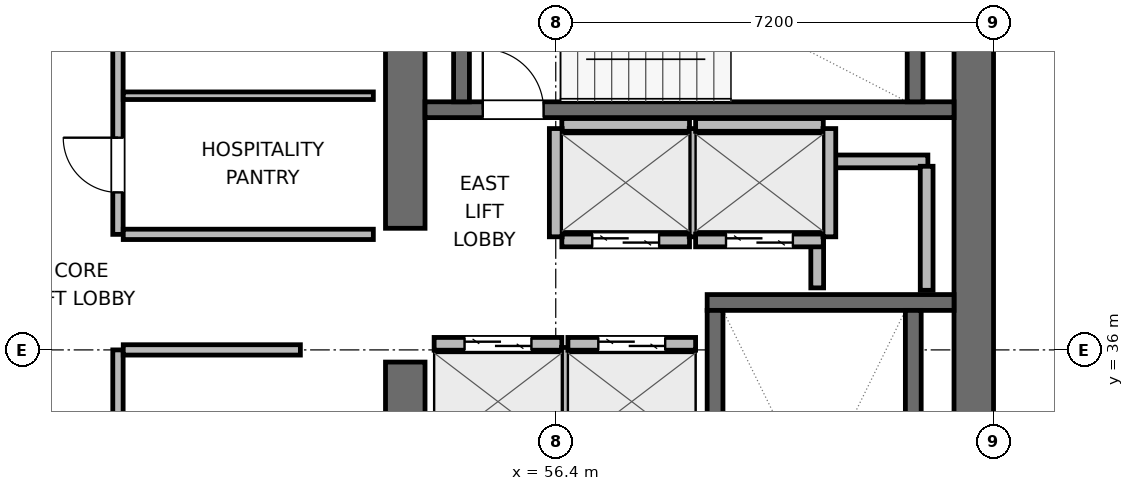
"""IFC4 building model, lengths in metres.
Left out: names, types, materials, properties, quantities, classifications, styles, units other than length and angle.
Written with IfcOpenShell. Run it as: python <this file> out.ifc"""

import sys

from ifc_helpers import new_model, si_unit, direction, frame, frame_2d, origin, place, context, subcontext, project, spatial, rectangle, extrude, element, fill, save


model = new_model("IFC4")
c1 = context("Model", 3, precision=1e-05, world=origin(), true_north=direction((0.0, 1.0)))
c2 = subcontext(c1, "Body", "Model", "MODEL_VIEW")
j1 = project(units=[si_unit("LENGTHUNIT", "METRE"), si_unit("PLANEANGLEUNIT", "RADIAN")], contexts=[c1])
p1 = place(None, origin())
s1 = spatial("IfcSite", under=j1, at=p1, CompositionType="ELEMENT")
p2 = place(p1, origin())
s2 = spatial("IfcBuilding", under=s1, at=p2, CompositionType="ELEMENT")
p3 = place(p2, frame((0.0, 0.0, 219.3)))
s3 = spatial("IfcBuildingStorey", under=s2, at=p3, CompositionType="ELEMENT", Elevation=219.3)
p4 = place(p3, frame((53.925, 27.925, 0.0), z_axis=(0.0, 0.0, 1.0), x_axis=(0.0, 1.0, 0.0)))
e1 = element("IfcWall", 1, at=p4, inside=s3, PredefinedType="SHEAR", context=c2, shape_type="SweptSolid", body=[
    extrude(rectangle(XDim=7.875, YDim=0.65, at=frame_2d((3.938, 0.0))), origin(), (0.0, 0.0, 1.0), 3.9),
])
p5 = place(p3, frame((53.925, 38.0, 0.0), z_axis=(0.0, 0.0, 1.0), x_axis=(0.0, 1.0, 0.0)))
e2 = element("IfcWall", 2, at=p5, inside=s3, PredefinedType="SHEAR", context=c2, shape_type="SweptSolid", body=[
    extrude(rectangle(XDim=6.075, YDim=0.65, at=frame_2d((3.038, 0.0))), origin(), (0.0, 0.0, 1.0), 3.9),
])
p6 = place(p3, frame((63.275, 27.6, 0.0), z_axis=(0.0, 0.0, 1.0), x_axis=(0.0, 1.0, 0.0)))
e3 = element("IfcWall", 3, at=p6, inside=s3, PredefinedType="SHEAR", context=c2, shape_type="SweptSolid", body=[
    extrude(rectangle(XDim=16.8, YDim=0.65, at=frame_2d((8.4, 0.0))), origin(), (0.0, 0.0, 1.0), 3.9),
])
p7 = place(p3, frame((58.89, 36.78, 0.0), z_axis=(0.0, 0.0, 1.0), x_axis=(1.0, 0.0, 0.0)))
e4 = element("IfcWall", 4, at=p7, inside=s3, PredefinedType="SHEAR", context=c2, shape_type="SweptSolid", body=[
    extrude(rectangle(XDim=4.06, YDim=0.26, at=frame_2d((2.03, 0.0))), origin(), (0.0, 0.0, 1.0), 3.9),
])
p8 = place(p3, frame((59.02, 29.05, 0.0), z_axis=(0.0, 0.0, 1.0), x_axis=(0.0, 1.0, 0.0)))
e5 = element("IfcWall", 5, at=p8, inside=s3, PredefinedType="SHEAR", context=c2, shape_type="SweptSolid", body=[
    extrude(rectangle(XDim=7.6, YDim=0.26, at=frame_2d((3.8, 0.0))), origin(), (0.0, 0.0, 1.0), 3.9),
])
p9 = place(p8, frame((0.3, 0.0, 0.0)))
e6 = element("IfcOpeningElement", 6, at=p9, cuts=e5, PredefinedType="OPENING", context=c2, shape_type="SweptSolid", body=[
    extrude(rectangle(XDim=1.0, YDim=2.04, at=frame_2d((0.5, 1.02))), frame((0.0, 0.14, 0.0), z_axis=(0.0, -1.0, 0.0), x_axis=(1.0, 0.0, 0.0)), (0.0, 0.0, 1.0), 0.28),
])
p10 = place(p3, frame((62.28, 29.05, 0.0), z_axis=(0.0, 0.0, 1.0), x_axis=(0.0, 1.0, 0.0)))
e7 = element("IfcWall", 7, at=p10, inside=s3, PredefinedType="SHEAR", context=c2, shape_type="SweptSolid", body=[
    extrude(rectangle(XDim=7.6, YDim=0.26, at=frame_2d((3.8, 0.0))), origin(), (0.0, 0.0, 1.0), 3.9),
])
p11 = place(p3, frame((54.25, 39.95, 0.0), z_axis=(0.0, 0.0, 1.0), x_axis=(1.0, 0.0, 0.0)))
e8 = element("IfcWall", 8, at=p11, inside=s3, PredefinedType="SHEAR", context=c2, shape_type="SweptSolid", body=[
    extrude(rectangle(XDim=8.7, YDim=0.26, at=frame_2d((4.35, 0.0))), origin(), (0.0, 0.0, 1.0), 3.9),
])
p12 = place(p11, frame((0.95, 0.0, 0.0)))
e9 = element("IfcOpeningElement", 9, at=p12, cuts=e8, PredefinedType="OPENING", context=c2, shape_type="SweptSolid", body=[
    extrude(rectangle(XDim=1.0, YDim=2.04, at=frame_2d((0.5, 1.02))), frame((0.0, 0.14, 0.0), z_axis=(0.0, -1.0, 0.0), x_axis=(1.0, 0.0, 0.0)), (0.0, 0.0, 1.0), 0.28),
])
for number, where, z_axis, x_axis in (
    (10, (54.85, 40.08, 0.0), (0.0, 0.0, 1.0), (0.0, 1.0, 0.0)),
    (11, (62.31, 40.08, 0.0), (0.0, 0.0, 1.0), (0.0, 1.0, 0.0)),
):
    element("IfcWall", number, at=place(p3, frame(where, z_axis=z_axis, x_axis=x_axis)), inside=s3, PredefinedType="SHEAR", context=c2, shape_type="SweptSolid", body=[
        extrude(rectangle(XDim=2.94, YDim=0.26, at=frame_2d((1.47, 0.0))), origin(), (0.0, 0.0, 1.0), 3.9),
    ])
p13 = place(p3, frame((60.72, 39.1, 0.0), z_axis=(0.0, 0.0, 1.0), x_axis=(1.0, 0.0, 0.0)))
e12 = element("IfcWall", 12, at=p13, inside=s3, PredefinedType="PARTITIONING", context=c2, shape_type="SweptSolid", body=[
    extrude(rectangle(XDim=1.8, YDim=0.21, at=frame_2d((0.9, 0.0))), origin(), (0.0, 0.0, 1.0), 3.68),
])
p14 = place(p3, frame((60.7, 37.02, 0.0), z_axis=(0.0, 0.0, 1.0), x_axis=(0.0, 1.0, 0.0)))
e13 = element("IfcWall", 13, at=p14, inside=s3, PredefinedType="PARTITIONING", context=c2, shape_type="SweptSolid", body=[
    extrude(rectangle(XDim=1.96, YDim=0.21, at=frame_2d((0.98, 0.0))), origin(), (0.0, 0.0, 1.0), 3.68),
])
p15 = place(p3, frame((62.5, 36.98, 0.0), z_axis=(0.0, 0.0, 1.0), x_axis=(0.0, 1.0, 0.0)))
e14 = element("IfcWall", 14, at=p15, inside=s3, PredefinedType="PARTITIONING", context=c2, shape_type="SweptSolid", body=[
    extrude(rectangle(XDim=2.04, YDim=0.21, at=frame_2d((1.02, 0.0))), origin(), (0.0, 0.0, 1.0), 3.68),
])
p16 = place(p3, frame((54.4, 36.1, 0.0), z_axis=(0.0, 0.0, 1.0), x_axis=(1.0, 0.0, 0.0)))
e15 = element("IfcWall", 15, at=p16, inside=s3, PredefinedType="PARTITIONING", context=c2, shape_type="SweptSolid", body=[
    extrude(rectangle(XDim=2.1, YDim=0.21, at=frame_2d((1.05, 0.0))), origin(), (0.0, 0.0, 1.0), 3.68),
])
p17 = place(p16, frame((0.5, 0.0, 0.0)))
e16 = element("IfcOpeningElement", 16, at=p17, cuts=e15, PredefinedType="OPENING", context=c2, shape_type="SweptSolid", body=[
    extrude(rectangle(XDim=1.1, YDim=2.04, at=frame_2d((0.55, 1.02))), frame((0.0, 0.115, 0.0), z_axis=(0.0, -1.0, 0.0), x_axis=(1.0, 0.0, 0.0)), (0.0, 0.0, 1.0), 0.23),
])
p18 = place(p3, frame((56.6, 34.26, 0.0), z_axis=(0.0, 0.0, 1.0), x_axis=(0.0, 1.0, 0.0)))
e17 = element("IfcWall", 17, at=p18, inside=s3, PredefinedType="PARTITIONING", context=c2, shape_type="SweptSolid", body=[
    extrude(rectangle(XDim=1.78, YDim=0.21, at=frame_2d((0.89, 0.0))), origin(), (0.0, 0.0, 1.0), 3.68),
])
p19 = place(p3, frame((56.6, 36.1, 0.0), z_axis=(0.0, 0.0, 1.0), x_axis=(1.0, 0.0, 0.0)))
e18 = element("IfcWall", 18, at=p19, inside=s3, PredefinedType="PARTITIONING", context=c2, shape_type="SweptSolid", body=[
    extrude(rectangle(XDim=2.1, YDim=0.21, at=frame_2d((1.05, 0.0))), origin(), (0.0, 0.0, 1.0), 3.68),
])
p20 = place(p19, frame((0.5, 0.0, 0.0)))
e19 = element("IfcOpeningElement", 19, at=p20, cuts=e18, PredefinedType="OPENING", context=c2, shape_type="SweptSolid", body=[
    extrude(rectangle(XDim=1.1, YDim=2.04, at=frame_2d((0.55, 1.02))), frame((0.0, 0.115, 0.0), z_axis=(0.0, -1.0, 0.0), x_axis=(1.0, 0.0, 0.0)), (0.0, 0.0, 1.0), 0.23),
])
p21 = place(p3, frame((56.5, 37.8, 0.0), z_axis=(0.0, 0.0, 1.0), x_axis=(1.0, 0.0, 0.0)))
e20 = element("IfcWall", 20, at=p21, inside=s3, PredefinedType="PARTITIONING", context=c2, shape_type="SweptSolid", body=[
    extrude(rectangle(XDim=2.1, YDim=0.21, at=frame_2d((1.05, 0.0))), origin(), (0.0, 0.0, 1.0), 3.68),
])
p22 = place(p21, frame((0.5, 0.0, 0.0)))
e21 = element("IfcOpeningElement", 21, at=p22, cuts=e20, PredefinedType="OPENING", context=c2, shape_type="SweptSolid", body=[
    extrude(rectangle(XDim=1.1, YDim=2.04, at=frame_2d((0.55, 1.02))), frame((0.0, 0.115, 0.0), z_axis=(0.0, -1.0, 0.0), x_axis=(1.0, 0.0, 0.0)), (0.0, 0.0, 1.0), 0.23),
])
p23 = place(p3, frame((56.5, 39.7, 0.0), z_axis=(0.0, 0.0, 1.0), x_axis=(1.0, 0.0, 0.0)))
e22 = element("IfcWall", 22, at=p23, inside=s3, PredefinedType="PARTITIONING", context=c2, shape_type="SweptSolid", body=[
    extrude(rectangle(XDim=2.1, YDim=0.21, at=frame_2d((1.05, 0.0))), origin(), (0.0, 0.0, 1.0), 3.68),
])
for number, where, z_axis, x_axis in (
    (23, (56.4, 37.86, 0.0), (0.0, 0.0, 1.0), (0.0, 1.0, 0.0)),
    (24, (58.7, 37.86, 0.0), (0.0, 0.0, 1.0), (0.0, 1.0, 0.0)),
):
    element("IfcWall", number, at=place(p3, frame(where, z_axis=z_axis, x_axis=x_axis)), inside=s3, PredefinedType="PARTITIONING", context=c2, shape_type="SweptSolid", body=[
        extrude(rectangle(XDim=1.78, YDim=0.21, at=frame_2d((0.89, 0.0))), origin(), (0.0, 0.0, 1.0), 3.68),
    ])
p24 = place(p3, frame((58.7, 37.8, 0.0), z_axis=(0.0, 0.0, 1.0), x_axis=(1.0, 0.0, 0.0)))
e25 = element("IfcWall", 25, at=p24, inside=s3, PredefinedType="PARTITIONING", context=c2, shape_type="SweptSolid", body=[
    extrude(rectangle(XDim=2.1, YDim=0.21, at=frame_2d((1.05, 0.0))), origin(), (0.0, 0.0, 1.0), 3.68),
])
p25 = place(p24, frame((0.5, 0.0, 0.0)))
e26 = element("IfcOpeningElement", 26, at=p25, cuts=e25, PredefinedType="OPENING", context=c2, shape_type="SweptSolid", body=[
    extrude(rectangle(XDim=1.1, YDim=2.04, at=frame_2d((0.55, 1.02))), frame((0.0, 0.115, 0.0), z_axis=(0.0, -1.0, 0.0), x_axis=(1.0, 0.0, 0.0)), (0.0, 0.0, 1.0), 0.23),
])
p26 = place(p3, frame((58.7, 39.7, 0.0), z_axis=(0.0, 0.0, 1.0), x_axis=(1.0, 0.0, 0.0)))
e27 = element("IfcWall", 27, at=p26, inside=s3, PredefinedType="PARTITIONING", context=c2, shape_type="SweptSolid", body=[
    extrude(rectangle(XDim=2.1, YDim=0.21, at=frame_2d((1.05, 0.0))), origin(), (0.0, 0.0, 1.0), 3.68),
])
p27 = place(p3, frame((60.9, 37.86, 0.0), z_axis=(0.0, 0.0, 1.0), x_axis=(0.0, 1.0, 0.0)))
e28 = element("IfcWall", 28, at=p27, inside=s3, PredefinedType="PARTITIONING", context=c2, shape_type="SweptSolid", body=[
    extrude(rectangle(XDim=1.78, YDim=0.21, at=frame_2d((0.89, 0.0))), origin(), (0.0, 0.0, 1.0), 3.68),
])
p28 = place(p3, frame((49.2, 32.6, 0.0), z_axis=(0.0, 0.0, 1.0), x_axis=(0.0, 1.0, 0.0)))
e29 = element("IfcWall", 29, at=p28, inside=s3, PredefinedType="PARTITIONING", context=c2, shape_type="SweptSolid", body=[
    extrude(rectangle(XDim=3.4, YDim=0.17, at=frame_2d((1.7, 0.0))), origin(), (0.0, 0.0, 1.0), 3.68),
])
p29 = place(p28, frame((0.638, 0.0, 0.0)))
e30 = element("IfcOpeningElement", 30, at=p29, cuts=e29, PredefinedType="OPENING", context=c2, shape_type="SweptSolid", body=[
    extrude(rectangle(XDim=0.9, YDim=2.02, at=frame_2d((0.45, 1.01))), frame((0.0, 0.095, 0.0), z_axis=(0.0, -1.0, 0.0), x_axis=(1.0, 0.0, 0.0)), (0.0, 0.0, 1.0), 0.19),
])
p30 = place(p3, frame((49.287, 36.0, 0.0), z_axis=(0.0, 0.0, 1.0), x_axis=(1.0, 0.0, 0.0)))
e31 = element("IfcWall", 31, at=p30, inside=s3, PredefinedType="PARTITIONING", context=c2, shape_type="SweptSolid", body=[
    extrude(rectangle(XDim=2.913, YDim=0.17, at=frame_2d((1.457, 0.0))), origin(), (0.0, 0.0, 1.0), 3.68),
])
p31 = place(p3, frame((49.2, 37.9, 0.0), z_axis=(0.0, 0.0, 1.0), x_axis=(0.0, 1.0, 0.0)))
e32 = element("IfcWall", 32, at=p31, inside=s3, PredefinedType="PARTITIONING", context=c2, shape_type="SweptSolid", body=[
    extrude(rectangle(XDim=6.0, YDim=0.17, at=frame_2d((3.0, 0.0))), origin(), (0.0, 0.0, 1.0), 3.68),
])
p32 = place(p31, frame((0.69, 0.0, 0.0)))
e33 = element("IfcOpeningElement", 33, at=p32, cuts=e32, PredefinedType="OPENING", context=c2, shape_type="SweptSolid", body=[
    extrude(rectangle(XDim=0.9, YDim=2.02, at=frame_2d((0.45, 1.01))), frame((0.0, 0.095, 0.0), z_axis=(0.0, -1.0, 0.0), x_axis=(1.0, 0.0, 0.0)), (0.0, 0.0, 1.0), 0.19),
])
p33 = place(p31, frame((3.69, 0.0, 0.0)))
e34 = element("IfcOpeningElement", 34, at=p33, cuts=e32, PredefinedType="OPENING", context=c2, shape_type="SweptSolid", body=[
    extrude(rectangle(XDim=0.9, YDim=2.02, at=frame_2d((0.45, 1.01))), frame((0.0, 0.095, 0.0), z_axis=(0.0, -1.0, 0.0), x_axis=(1.0, 0.0, 0.0)), (0.0, 0.0, 1.0), 0.19),
])
p34 = place(p3, frame((49.287, 37.9, 0.0), z_axis=(0.0, 0.0, 1.0), x_axis=(1.0, 0.0, 0.0)))
e35 = element("IfcWall", 35, at=p34, inside=s3, PredefinedType="PARTITIONING", context=c2, shape_type="SweptSolid", body=[
    extrude(rectangle(XDim=4.113, YDim=0.17, at=frame_2d((2.056, 0.0))), origin(), (0.0, 0.0, 1.0), 3.68),
])
p35 = place(p3, frame((49.287, 40.18, 0.0), z_axis=(0.0, 0.0, 1.0), x_axis=(1.0, 0.0, 0.0)))
e36 = element("IfcWall", 36, at=p35, inside=s3, PredefinedType="PARTITIONING", context=c2, shape_type="SweptSolid", body=[
    extrude(rectangle(XDim=4.113, YDim=0.125, at=frame_2d((2.056, 0.0))), origin(), (0.0, 0.0, 1.0), 3.68),
])
p36 = place(p12, origin())
e37 = element("IfcDoor", 37, at=p36, inside=s3, OperationType="SINGLE_SWING_LEFT", PredefinedType="DOOR", context=c2, shape_type="SweptSolid", body=[
    extrude(rectangle(XDim=1.0, YDim=2.04, at=frame_2d((0.5, 1.02))), frame((0.0, 0.025, 0.0), z_axis=(0.0, -1.0, 0.0), x_axis=(1.0, 0.0, 0.0)), (0.0, 0.0, 1.0), 0.05),
])
fill(e9, e37)
p37 = place(p17, origin())
e38 = element("IfcDoor", 38, at=p37, inside=s3, OperationType="DOUBLE_DOOR_SLIDING", PredefinedType="DOOR", context=c2, shape_type="SweptSolid", body=[
    extrude(rectangle(XDim=1.1, YDim=2.04, at=frame_2d((0.55, 1.02))), frame((0.0, 0.025, 0.0), z_axis=(0.0, -1.0, 0.0), x_axis=(1.0, 0.0, 0.0)), (0.0, 0.0, 1.0), 0.05),
])
fill(e16, e38)
p38 = place(p20, origin())
e39 = element("IfcDoor", 39, at=p38, inside=s3, OperationType="DOUBLE_DOOR_SLIDING", PredefinedType="DOOR", context=c2, shape_type="SweptSolid", body=[
    extrude(rectangle(XDim=1.1, YDim=2.04, at=frame_2d((0.55, 1.02))), frame((0.0, 0.025, 0.0), z_axis=(0.0, -1.0, 0.0), x_axis=(1.0, 0.0, 0.0)), (0.0, 0.0, 1.0), 0.05),
])
fill(e19, e39)
p39 = place(p22, origin())
e40 = element("IfcDoor", 40, at=p39, inside=s3, OperationType="DOUBLE_DOOR_SLIDING", PredefinedType="DOOR", context=c2, shape_type="SweptSolid", body=[
    extrude(rectangle(XDim=1.1, YDim=2.04, at=frame_2d((0.55, 1.02))), frame((0.0, 0.025, 0.0), z_axis=(0.0, -1.0, 0.0), x_axis=(1.0, 0.0, 0.0)), (0.0, 0.0, 1.0), 0.05),
])
fill(e21, e40)
p40 = place(p25, origin())
e41 = element("IfcDoor", 41, at=p40, inside=s3, OperationType="DOUBLE_DOOR_SLIDING", PredefinedType="DOOR", context=c2, shape_type="SweptSolid", body=[
    extrude(rectangle(XDim=1.1, YDim=2.04, at=frame_2d((0.55, 1.02))), frame((0.0, 0.025, 0.0), z_axis=(0.0, -1.0, 0.0), x_axis=(1.0, 0.0, 0.0)), (0.0, 0.0, 1.0), 0.05),
])
fill(e26, e41)
p41 = place(p32, origin())
e42 = element("IfcDoor", 42, at=p41, inside=s3, OperationType="SINGLE_SWING_RIGHT", PredefinedType="DOOR", context=c2, shape_type="SweptSolid", body=[
    extrude(rectangle(XDim=0.9, YDim=2.02, at=frame_2d((0.45, 1.01))), frame((0.0, 0.025, 0.0), z_axis=(0.0, -1.0, 0.0), x_axis=(1.0, 0.0, 0.0)), (0.0, 0.0, 1.0), 0.05),
])
fill(e33, e42)
save(model, sys.argv[1])
